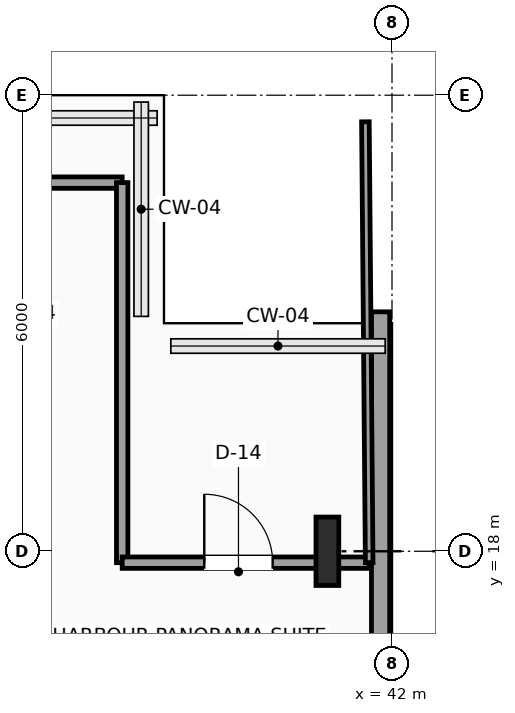
"""IFC4 building model, lengths in metres.
Left out: names, types, materials, properties, quantities, classifications, styles, units other than length and angle.
Written with IfcOpenShell. Run it as: python <this file> out.ifc"""

import sys

from ifc_helpers import new_model, si_unit, direction, frame, frame_2d, origin, origin_2d, place, context, subcontext, project, spatial, rectangle, i_section, extrude, element, fill, save


model = new_model("IFC4")
c1 = context("Model", 3, precision=1e-05, world=origin(), true_north=direction((0.0, 1.0)))
c2 = subcontext(c1, "Body", "Model", "MODEL_VIEW")
j1 = project(units=[si_unit("LENGTHUNIT", "METRE"), si_unit("PLANEANGLEUNIT", "RADIAN")], contexts=[c1])
p1 = place(None, origin())
s1 = spatial("IfcSite", under=j1, at=p1, CompositionType="ELEMENT")
p2 = place(p1, origin())
s2 = spatial("IfcBuilding", under=s1, at=p2, CompositionType="ELEMENT")
p3 = place(p2, frame((0.0, 0.0, 195.45)))
s3 = spatial("IfcBuildingStorey", under=s2, at=p3, CompositionType="ELEMENT", Elevation=195.45)
p4 = place(p3, frame((41.15, 18.0, 0.0), z_axis=(0.0, 0.0, 1.0), x_axis=(1.0, 0.0, 0.0)))
e1 = element("IfcColumn", 1, at=p4, inside=s3, PredefinedType="COLUMN", context=c2, shape_type="SweptSolid", body=[
    extrude(i_section(OverallWidth=0.3, OverallDepth=0.9, WebThickness=0.019, FlangeThickness=0.035, FilletRadius=0.03, at=origin_2d()), origin(), (0.0, 0.0, 1.0), 3.75),
])
p5 = place(p3, frame((41.85, 21.15, 0.0), z_axis=(0.0, 0.0, 1.0), x_axis=(0.0, -1.0, 0.0)))
e2 = element("IfcWall", 2, at=p5, inside=s3, PredefinedType="SOLIDWALL", context=c2, shape_type="SweptSolid", body=[
    extrude(rectangle(XDim=18.3, YDim=0.24, at=frame_2d((9.15, 0.0))), origin(), (0.0, 0.0, 1.0), 3.475),
])
p6 = place(p3, frame((36.35, 22.85, 0.0), z_axis=(0.0, 0.0, 1.0), x_axis=(1.0, 0.0, 0.0)))
e3 = element("IfcWall", 3, at=p6, inside=s3, PredefinedType="PARTITIONING", context=c2, shape_type="SweptSolid", body=[
    extrude(rectangle(XDim=2.1, YDim=0.15, at=frame_2d((1.05, 0.0))), origin(), (0.0, 0.0, 1.0), 3.475),
])
p7 = place(p3, frame((38.45, 22.85, 0.0), z_axis=(0.0, 0.0, 1.0), x_axis=(0.0, -1.0, 0.0)))
e4 = element("IfcWall", 4, at=p7, inside=s3, PredefinedType="PARTITIONING", context=c2, shape_type="SweptSolid", body=[
    extrude(rectangle(XDim=5.0, YDim=0.15, at=frame_2d((2.5, 0.0))), origin(), (0.0, 0.0, 1.0), 3.475),
])
p8 = place(p3, frame((38.45, 17.85, 0.0), z_axis=(0.0, 0.0, 1.0), x_axis=(1.0, 0.0, 0.0)))
e5 = element("IfcWall", 5, at=p8, inside=s3, PredefinedType="PARTITIONING", context=c2, shape_type="SweptSolid", body=[
    extrude(rectangle(XDim=3.25, YDim=0.15, at=frame_2d((1.625, 0.0))), origin(), (0.0, 0.0, 1.0), 3.067),
])
p9 = place(p8, frame((1.08, 0.0, 0.0)))
e6 = element("IfcOpeningElement", 6, at=p9, cuts=e5, PredefinedType="OPENING", context=c2, shape_type="SweptSolid", body=[
    extrude(rectangle(XDim=0.9, YDim=2.1, at=frame_2d((0.45, 1.05))), frame((0.0, 0.085, 0.0), z_axis=(0.0, -1.0, 0.0), x_axis=(1.0, 0.0, 0.0)), (0.0, 0.0, 1.0), 0.17),
])
p10 = place(p3, frame((41.7, 17.85, 0.0), z_axis=(0.0, 0.0, 1.0), x_axis=(-0.008629077606, 0.999962768817, 0.0)))
e7 = element("IfcWall", 7, at=p10, inside=s3, PredefinedType="PARTITIONING", context=c2, shape_type="SweptSolid", body=[
    extrude(rectangle(XDim=5.8, YDim=0.1, at=frame_2d((2.9, 0.0))), origin(), (0.0, 0.0, 1.0), 3.475),
])
p11 = place(p9, origin())
e8 = element("IfcDoor", 8, at=p11, inside=s3, OperationType="SINGLE_SWING_LEFT", PredefinedType="DOOR", context=c2, shape_type="SweptSolid", body=[
    extrude(rectangle(XDim=0.9, YDim=2.1, at=frame_2d((0.45, 1.05))), frame((0.0, 0.025, 0.0), z_axis=(0.0, -1.0, 0.0), x_axis=(1.0, 0.0, 0.0)), (0.0, 0.0, 1.0), 0.05),
])
fill(e6, e8)
save(model, sys.argv[1])
